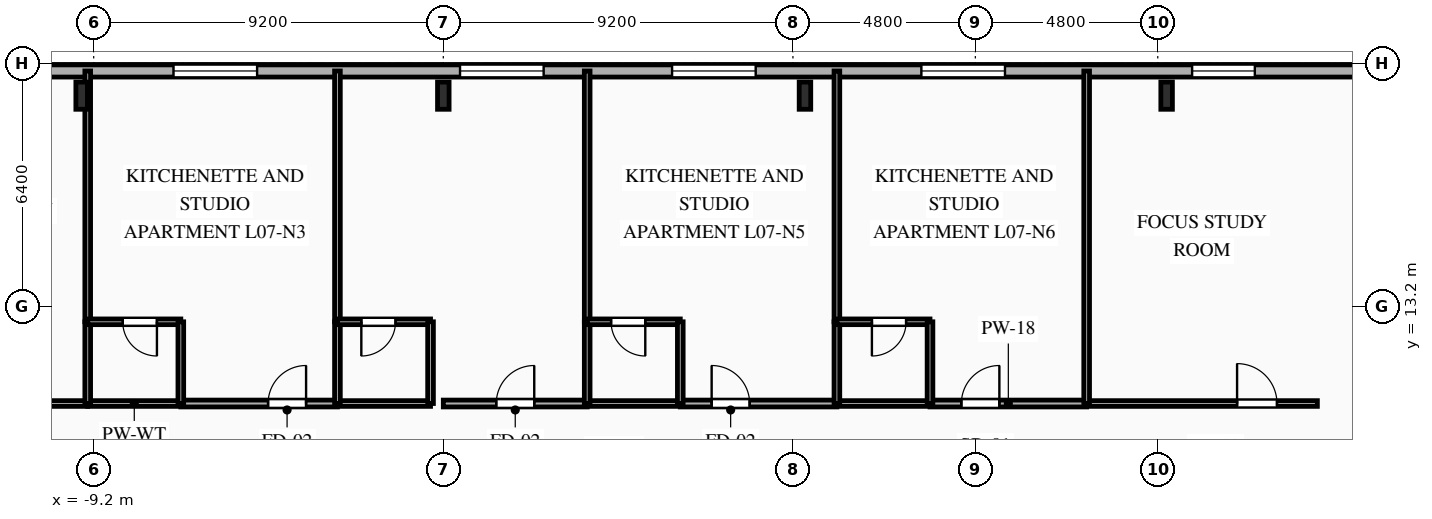
"""IFC4 building model, lengths in metres.
Left out: names, types, materials, properties, quantities, classifications, styles, units other than length and angle.
Written with IfcOpenShell. Run it as: python <this file> out.ifc"""

import sys

from ifc_helpers import new_model, si_unit, direction, frame, frame_2d, origin, origin_2d, place, context, subcontext, project, spatial, rectangle, i_section, extrude, element, fill, save


model = new_model("IFC4")
c1 = context("Model", 3, precision=1e-05, world=origin(), true_north=direction((0.0, 1.0)))
c2 = subcontext(c1, "Body", "Model", "MODEL_VIEW")
j1 = project(units=[si_unit("LENGTHUNIT", "METRE"), si_unit("PLANEANGLEUNIT", "RADIAN")], contexts=[c1])
p1 = place(None, origin())
s1 = spatial("IfcSite", under=j1, at=p1, CompositionType="ELEMENT")
p2 = place(p1, origin())
s2 = spatial("IfcBuilding", under=s1, at=p2, CompositionType="ELEMENT")
p3 = place(p2, frame((0.0, 0.0, 30.35)))
s3 = spatial("IfcBuildingStorey", under=s2, at=p3, CompositionType="ELEMENT", Elevation=30.35)
for number, where, z_axis, x_axis in (
    (1, (19.033, 18.75, 0.0), (0.0, 0.0, 1.0), (1.0, 0.0, 0.0)),
    (2, (9.517, 18.75, 0.0), (0.0, 0.0, 1.0), (1.0, 0.0, 0.0)),
    (3, (0.0, 18.75, 0.0), (0.0, 0.0, 1.0), (1.0, 0.0, 0.0)),
    (4, (-9.517, 18.75, 0.0), (0.0, 0.0, 1.0), (1.0, 0.0, 0.0)),
):
    element("IfcColumn", number, at=place(p3, frame(where, z_axis=z_axis, x_axis=x_axis)), inside=s3, PredefinedType="COLUMN", context=c2, shape_type="SweptSolid", body=[
        extrude(i_section(OverallWidth=0.304, OverallDepth=0.716, WebThickness=0.021, FlangeThickness=0.04, FilletRadius=0.027, at=origin_2d()), origin(), (0.0, 0.0, 1.0), 3.35),
    ])
p4 = place(p3, frame((-29.2, 19.4, 0.0), z_axis=(0.0, 0.0, 1.0), x_axis=(1.0, 0.0, 0.0)))
e5 = element("IfcWall", 5, at=p4, inside=s3, PredefinedType="SOLIDWALL", context=c2, shape_type="SweptSolid", body=[
    extrude(rectangle(XDim=58.4, YDim=0.32, at=frame_2d((29.2, 0.0))), origin(), (0.0, 0.0, 1.0), 3.035),
])
p5 = place(p4, frame((8.261, 0.0, 0.85)))
e6 = element("IfcOpeningElement", 6, at=p5, cuts=e5, PredefinedType="OPENING", context=c2, shape_type="SweptSolid", body=[
    extrude(rectangle(XDim=1.65, YDim=1.85, at=frame_2d((0.825, 0.925))), frame((0.0, 0.17, 0.0), z_axis=(0.0, -1.0, 0.0), x_axis=(1.0, 0.0, 0.0)), (0.0, 0.0, 1.0), 0.34),
])
p6 = place(p4, frame((17.0, 0.0, 0.85)))
e7 = element("IfcOpeningElement", 7, at=p6, cuts=e5, PredefinedType="OPENING", context=c2, shape_type="SweptSolid", body=[
    extrude(rectangle(XDim=1.6, YDim=1.85, at=frame_2d((0.8, 0.925))), frame((0.0, 0.17, 0.0), z_axis=(0.0, -1.0, 0.0), x_axis=(1.0, 0.0, 0.0)), (0.0, 0.0, 1.0), 0.34),
])
p7 = place(p4, frame((22.1, 0.0, 0.85)))
e8 = element("IfcOpeningElement", 8, at=p7, cuts=e5, PredefinedType="OPENING", context=c2, shape_type="SweptSolid", body=[
    extrude(rectangle(XDim=2.2, YDim=1.85, at=frame_2d((1.1, 0.925))), frame((0.0, 0.17, 0.0), z_axis=(0.0, -1.0, 0.0), x_axis=(1.0, 0.0, 0.0)), (0.0, 0.0, 1.0), 0.34),
])
p8 = place(p4, frame((29.64, 0.0, 0.85)))
e9 = element("IfcOpeningElement", 9, at=p8, cuts=e5, PredefinedType="OPENING", context=c2, shape_type="SweptSolid", body=[
    extrude(rectangle(XDim=2.2, YDim=1.85, at=frame_2d((1.1, 0.925))), frame((0.0, 0.17, 0.0), z_axis=(0.0, -1.0, 0.0), x_axis=(1.0, 0.0, 0.0)), (0.0, 0.0, 1.0), 0.34),
])
p9 = place(p4, frame((35.22, 0.0, 0.85)))
e10 = element("IfcOpeningElement", 10, at=p9, cuts=e5, PredefinedType="OPENING", context=c2, shape_type="SweptSolid", body=[
    extrude(rectangle(XDim=2.2, YDim=1.85, at=frame_2d((1.1, 0.925))), frame((0.0, 0.17, 0.0), z_axis=(0.0, -1.0, 0.0), x_axis=(1.0, 0.0, 0.0)), (0.0, 0.0, 1.0), 0.34),
])
p10 = place(p4, frame((41.78, 0.0, 0.85)))
e11 = element("IfcOpeningElement", 11, at=p10, cuts=e5, PredefinedType="OPENING", context=c2, shape_type="SweptSolid", body=[
    extrude(rectangle(XDim=2.2, YDim=1.85, at=frame_2d((1.1, 0.925))), frame((0.0, 0.17, 0.0), z_axis=(0.0, -1.0, 0.0), x_axis=(1.0, 0.0, 0.0)), (0.0, 0.0, 1.0), 0.34),
])
p11 = place(p4, frame((48.905, 0.0, 0.85)))
e12 = element("IfcOpeningElement", 12, at=p11, cuts=e5, PredefinedType="OPENING", context=c2, shape_type="SweptSolid", body=[
    extrude(rectangle(XDim=1.65, YDim=1.85, at=frame_2d((0.825, 0.925))), frame((0.0, 0.17, 0.0), z_axis=(0.0, -1.0, 0.0), x_axis=(1.0, 0.0, 0.0)), (0.0, 0.0, 1.0), 0.34),
])
p12 = place(p3, frame((-13.579, 10.65, 0.0), z_axis=(0.0, 0.0, 1.0), x_axis=(1.0, 0.0, 0.0)))
e13 = element("IfcWall", 13, at=p12, inside=s3, PredefinedType="PARTITIONING", context=c2, shape_type="SweptSolid", body=[
    extrude(rectangle(XDim=4.222, YDim=0.15, at=frame_2d((2.111, 0.0))), origin(), (0.0, 0.0, 1.0), 3.035),
])
p13 = place(p12, frame((0.844, 0.0, 0.0)))
e14 = element("IfcOpeningElement", 14, at=p13, cuts=e13, PredefinedType="OPENING", context=c2, shape_type="SweptSolid", body=[
    extrude(rectangle(XDim=0.95, YDim=2.1, at=frame_2d((0.475, 1.05))), frame((0.0, 0.085, 0.0), z_axis=(0.0, -1.0, 0.0), x_axis=(1.0, 0.0, 0.0)), (0.0, 0.0, 1.0), 0.17),
])
p14 = place(p3, frame((-6.907, 10.65, 0.0), z_axis=(0.0, 0.0, 1.0), x_axis=(1.0, 0.0, 0.0)))
e15 = element("IfcWall", 15, at=p14, inside=s3, PredefinedType="PARTITIONING", context=c2, shape_type="SweptSolid", body=[
    extrude(rectangle(XDim=4.121, YDim=0.18, at=frame_2d((2.061, 0.0))), origin(), (0.0, 0.0, 1.0), 3.035),
])
p15 = place(p14, frame((2.296, 0.0, 0.0)))
e16 = element("IfcOpeningElement", 16, at=p15, cuts=e15, PredefinedType="OPENING", context=c2, shape_type="SweptSolid", body=[
    extrude(rectangle(XDim=1.0, YDim=2.15, at=frame_2d((0.5, 1.075))), frame((0.0, 0.1, 0.0), z_axis=(0.0, -1.0, 0.0), x_axis=(1.0, 0.0, 0.0)), (0.0, 0.0, 1.0), 0.2),
])
for number, where, z_axis, x_axis in (
    (17, (-9.357, 10.65, 0.0), (0.0, 0.0, 1.0), (1.0, 0.0, 0.0)),
    (18, (-2.786, 10.65, 0.0), (0.0, 0.0, 1.0), (1.0, 0.0, 0.0)),
):
    element("IfcWall", number, at=place(p3, frame(where, z_axis=z_axis, x_axis=x_axis)), inside=s3, PredefinedType="PLUMBINGWALL", context=c2, shape_type="SweptSolid", body=[
        extrude(rectangle(XDim=2.45, YDim=0.15, at=frame_2d((1.225, 0.0))), origin(), (0.0, 0.0, 1.0), 3.035),
    ])
p16 = place(p3, frame((0.0, 10.65, 0.0), z_axis=(0.0, 0.0, 1.0), x_axis=(1.0, 0.0, 0.0)))
e19 = element("IfcWall", 19, at=p16, inside=s3, PredefinedType="PARTITIONING", context=c2, shape_type="SweptSolid", body=[
    extrude(rectangle(XDim=3.786, YDim=0.18, at=frame_2d((1.893, 0.0))), origin(), (0.0, 0.0, 1.0), 3.035),
])
p17 = place(p16, frame((1.393, 0.0, 0.0)))
e20 = element("IfcOpeningElement", 20, at=p17, cuts=e19, PredefinedType="OPENING", context=c2, shape_type="SweptSolid", body=[
    extrude(rectangle(XDim=1.0, YDim=2.15, at=frame_2d((0.5, 1.075))), frame((0.0, 0.1, 0.0), z_axis=(0.0, -1.0, 0.0), x_axis=(1.0, 0.0, 0.0)), (0.0, 0.0, 1.0), 0.2),
])
p18 = place(p3, frame((6.236, 10.65, 0.0), z_axis=(0.0, 0.0, 1.0), x_axis=(1.0, 0.0, 0.0)))
e21 = element("IfcWall", 21, at=p18, inside=s3, PredefinedType="PARTITIONING", context=c2, shape_type="SweptSolid", body=[
    extrude(rectangle(XDim=4.121, YDim=0.18, at=frame_2d((2.061, 0.0))), origin(), (0.0, 0.0, 1.0), 3.035),
])
p19 = place(p18, frame((0.825, 0.0, 0.0)))
e22 = element("IfcOpeningElement", 22, at=p19, cuts=e21, PredefinedType="OPENING", context=c2, shape_type="SweptSolid", body=[
    extrude(rectangle(XDim=1.0, YDim=2.15, at=frame_2d((0.5, 1.075))), frame((0.0, 0.1, 0.0), z_axis=(0.0, -1.0, 0.0), x_axis=(1.0, 0.0, 0.0)), (0.0, 0.0, 1.0), 0.2),
])
p20 = place(p3, frame((3.786, 10.65, 0.0), z_axis=(0.0, 0.0, 1.0), x_axis=(1.0, 0.0, 0.0)))
e23 = element("IfcWall", 23, at=p20, inside=s3, PredefinedType="PLUMBINGWALL", context=c2, shape_type="SweptSolid", body=[
    extrude(rectangle(XDim=2.45, YDim=0.15, at=frame_2d((1.225, 0.0))), origin(), (0.0, 0.0, 1.0), 3.035),
])
p21 = place(p3, frame((12.807, 10.65, 0.0), z_axis=(0.0, 0.0, 1.0), x_axis=(1.0, 0.0, 0.0)))
e24 = element("IfcWall", 24, at=p21, inside=s3, PredefinedType="PARTITIONING", context=c2, shape_type="SweptSolid", body=[
    extrude(rectangle(XDim=4.122, YDim=0.18, at=frame_2d((2.061, 0.0))), origin(), (0.0, 0.0, 1.0), 3.035),
])
p22 = place(p21, frame((0.825, 0.0, 0.0)))
e25 = element("IfcOpeningElement", 25, at=p22, cuts=e24, PredefinedType="OPENING", context=c2, shape_type="SweptSolid", body=[
    extrude(rectangle(XDim=1.0, YDim=2.15, at=frame_2d((0.5, 1.075))), frame((0.0, 0.1, 0.0), z_axis=(0.0, -1.0, 0.0), x_axis=(1.0, 0.0, 0.0)), (0.0, 0.0, 1.0), 0.2),
])
p23 = place(p3, frame((10.357, 10.65, 0.0), z_axis=(0.0, 0.0, 1.0), x_axis=(1.0, 0.0, 0.0)))
e26 = element("IfcWall", 26, at=p23, inside=s3, PredefinedType="PLUMBINGWALL", context=c2, shape_type="SweptSolid", body=[
    extrude(rectangle(XDim=2.45, YDim=0.15, at=frame_2d((1.225, 0.0))), origin(), (0.0, 0.0, 1.0), 3.035),
])
p24 = place(p3, frame((16.929, 10.65, 0.0), z_axis=(0.0, 0.0, 1.0), x_axis=(1.0, 0.0, 0.0)))
e27 = element("IfcWall", 27, at=p24, inside=s3, PredefinedType="PARTITIONING", context=c2, shape_type="SweptSolid", body=[
    extrude(rectangle(XDim=6.071, YDim=0.15, at=frame_2d((3.036, 0.0))), origin(), (0.0, 0.0, 1.0), 3.035),
])
p25 = place(p24, frame((3.958, 0.0, 0.0)))
e28 = element("IfcOpeningElement", 28, at=p25, cuts=e27, PredefinedType="OPENING", context=c2, shape_type="SweptSolid", body=[
    extrude(rectangle(XDim=1.05, YDim=2.15, at=frame_2d((0.525, 1.075))), frame((0.0, 0.085, 0.0), z_axis=(0.0, -1.0, 0.0), x_axis=(1.0, 0.0, 0.0)), (0.0, 0.0, 1.0), 0.17),
])
p26 = place(p3, frame((-9.357, 19.4, 0.0), z_axis=(0.0, 0.0, 1.0), x_axis=(0.0, -1.0, 0.0)))
e29 = element("IfcWall", 29, at=p26, inside=s3, PredefinedType="PARTITIONING", context=c2, shape_type="SweptSolid", body=[
    extrude(rectangle(XDim=6.6, YDim=0.15, at=frame_2d((3.3, 0.0))), origin(), (0.0, 0.0, 1.0), 2.52),
])
p27 = place(p3, frame((-9.357, 12.8, 0.0), z_axis=(0.0, 0.0, 1.0), x_axis=(0.0, -1.0, 0.0)))
e30 = element("IfcWall", 30, at=p27, inside=s3, PredefinedType="PLUMBINGWALL", context=c2, shape_type="SweptSolid", body=[
    extrude(rectangle(XDim=2.15, YDim=0.15, at=frame_2d((1.075, 0.0))), origin(), (0.0, 0.0, 1.0), 2.52),
])
p28 = place(p3, frame((-6.907, 12.8, 0.0), z_axis=(0.0, 0.0, 1.0), x_axis=(-1.0, 0.0, 0.0)))
e31 = element("IfcWall", 31, at=p28, inside=s3, PredefinedType="PLUMBINGWALL", context=c2, shape_type="SweptSolid", body=[
    extrude(rectangle(XDim=2.45, YDim=0.15, at=frame_2d((1.225, 0.0))), origin(), (0.0, 0.0, 1.0), 3.035),
])
p29 = place(p28, frame((0.629, 0.0, 0.0)))
e32 = element("IfcOpeningElement", 32, at=p29, cuts=e31, PredefinedType="OPENING", context=c2, shape_type="SweptSolid", body=[
    extrude(rectangle(XDim=0.9, YDim=2.1, at=frame_2d((0.45, 1.05))), frame((0.0, 0.085, 0.0), z_axis=(0.0, -1.0, 0.0), x_axis=(1.0, 0.0, 0.0)), (0.0, 0.0, 1.0), 0.17),
])
p30 = place(p3, frame((-6.907, 10.65, 0.0), z_axis=(0.0, 0.0, 1.0), x_axis=(0.0, 1.0, 0.0)))
e33 = element("IfcWall", 33, at=p30, inside=s3, PredefinedType="PLUMBINGWALL", context=c2, shape_type="SweptSolid", body=[
    extrude(rectangle(XDim=2.15, YDim=0.15, at=frame_2d((1.075, 0.0))), origin(), (0.0, 0.0, 1.0), 3.035),
])
p31 = place(p3, frame((-2.786, 19.4, 0.0), z_axis=(0.0, 0.0, 1.0), x_axis=(0.0, -1.0, 0.0)))
e34 = element("IfcWall", 34, at=p31, inside=s3, PredefinedType="PARTITIONING", context=c2, shape_type="SweptSolid", body=[
    extrude(rectangle(XDim=6.6, YDim=0.15, at=frame_2d((3.3, 0.0))), origin(), (0.0, 0.0, 1.0), 3.035),
])
p32 = place(p3, frame((-2.786, 12.8, 0.0), z_axis=(0.0, 0.0, 1.0), x_axis=(0.0, -1.0, 0.0)))
e35 = element("IfcWall", 35, at=p32, inside=s3, PredefinedType="PLUMBINGWALL", context=c2, shape_type="SweptSolid", body=[
    extrude(rectangle(XDim=2.15, YDim=0.15, at=frame_2d((1.075, 0.0))), origin(), (0.0, 0.0, 1.0), 3.035),
])
p33 = place(p3, frame((-0.336, 12.8, 0.0), z_axis=(0.0, 0.0, 1.0), x_axis=(-1.0, 0.0, 0.0)))
e36 = element("IfcWall", 36, at=p33, inside=s3, PredefinedType="PLUMBINGWALL", context=c2, shape_type="SweptSolid", body=[
    extrude(rectangle(XDim=2.45, YDim=0.15, at=frame_2d((1.225, 0.0))), origin(), (0.0, 0.0, 1.0), 3.035),
])
p34 = place(p33, frame((0.921, 0.0, 0.0)))
e37 = element("IfcOpeningElement", 37, at=p34, cuts=e36, PredefinedType="OPENING", context=c2, shape_type="SweptSolid", body=[
    extrude(rectangle(XDim=0.9, YDim=2.1, at=frame_2d((0.45, 1.05))), frame((0.0, 0.085, 0.0), z_axis=(0.0, -1.0, 0.0), x_axis=(1.0, 0.0, 0.0)), (0.0, 0.0, 1.0), 0.17),
])
p35 = place(p3, frame((-0.336, 10.65, 0.0), z_axis=(0.0, 0.0, 1.0), x_axis=(0.0, 1.0, 0.0)))
e38 = element("IfcWall", 38, at=p35, inside=s3, PredefinedType="PLUMBINGWALL", context=c2, shape_type="SweptSolid", body=[
    extrude(rectangle(XDim=2.15, YDim=0.15, at=frame_2d((1.075, 0.0))), origin(), (0.0, 0.0, 1.0), 3.035),
])
p36 = place(p3, frame((3.786, 19.4, 0.0), z_axis=(0.0, 0.0, 1.0), x_axis=(0.0, -1.0, 0.0)))
e39 = element("IfcWall", 39, at=p36, inside=s3, PredefinedType="PARTITIONING", context=c2, shape_type="SweptSolid", body=[
    extrude(rectangle(XDim=6.6, YDim=0.15, at=frame_2d((3.3, 0.0))), origin(), (0.0, 0.0, 1.0), 3.035),
])
p37 = place(p3, frame((3.786, 12.8, 0.0), z_axis=(0.0, 0.0, 1.0), x_axis=(0.0, -1.0, 0.0)))
e40 = element("IfcWall", 40, at=p37, inside=s3, PredefinedType="PLUMBINGWALL", context=c2, shape_type="SweptSolid", body=[
    extrude(rectangle(XDim=2.15, YDim=0.15, at=frame_2d((1.075, 0.0))), origin(), (0.0, 0.0, 1.0), 3.035),
])
p38 = place(p3, frame((6.236, 12.8, 0.0), z_axis=(0.0, 0.0, 1.0), x_axis=(-1.0, 0.0, 0.0)))
e41 = element("IfcWall", 41, at=p38, inside=s3, PredefinedType="PLUMBINGWALL", context=c2, shape_type="SweptSolid", body=[
    extrude(rectangle(XDim=2.45, YDim=0.15, at=frame_2d((1.225, 0.0))), origin(), (0.0, 0.0, 1.0), 3.035),
])
p39 = place(p38, frame((0.921, 0.0, 0.0)))
e42 = element("IfcOpeningElement", 42, at=p39, cuts=e41, PredefinedType="OPENING", context=c2, shape_type="SweptSolid", body=[
    extrude(rectangle(XDim=0.9, YDim=2.1, at=frame_2d((0.45, 1.05))), frame((0.0, 0.085, 0.0), z_axis=(0.0, -1.0, 0.0), x_axis=(1.0, 0.0, 0.0)), (0.0, 0.0, 1.0), 0.17),
])
p40 = place(p3, frame((6.236, 10.65, 0.0), z_axis=(0.0, 0.0, 1.0), x_axis=(0.0, 1.0, 0.0)))
e43 = element("IfcWall", 43, at=p40, inside=s3, PredefinedType="PLUMBINGWALL", context=c2, shape_type="SweptSolid", body=[
    extrude(rectangle(XDim=2.15, YDim=0.15, at=frame_2d((1.075, 0.0))), origin(), (0.0, 0.0, 1.0), 3.035),
])
p41 = place(p3, frame((10.357, 19.4, 0.0), z_axis=(0.0, 0.0, 1.0), x_axis=(0.0, -1.0, 0.0)))
e44 = element("IfcWall", 44, at=p41, inside=s3, PredefinedType="PARTITIONING", context=c2, shape_type="SweptSolid", body=[
    extrude(rectangle(XDim=6.6, YDim=0.15, at=frame_2d((3.3, 0.0))), origin(), (0.0, 0.0, 1.0), 3.035),
])
p42 = place(p3, frame((10.357, 12.8, 0.0), z_axis=(0.0, 0.0, 1.0), x_axis=(0.0, -1.0, 0.0)))
e45 = element("IfcWall", 45, at=p42, inside=s3, PredefinedType="PLUMBINGWALL", context=c2, shape_type="SweptSolid", body=[
    extrude(rectangle(XDim=2.15, YDim=0.15, at=frame_2d((1.075, 0.0))), origin(), (0.0, 0.0, 1.0), 3.035),
])
p43 = place(p3, frame((12.807, 12.8, 0.0), z_axis=(0.0, 0.0, 1.0), x_axis=(-1.0, 0.0, 0.0)))
e46 = element("IfcWall", 46, at=p43, inside=s3, PredefinedType="PLUMBINGWALL", context=c2, shape_type="SweptSolid", body=[
    extrude(rectangle(XDim=2.45, YDim=0.15, at=frame_2d((1.225, 0.0))), origin(), (0.0, 0.0, 1.0), 3.035),
])
p44 = place(p43, frame((0.629, 0.0, 0.0)))
e47 = element("IfcOpeningElement", 47, at=p44, cuts=e46, PredefinedType="OPENING", context=c2, shape_type="SweptSolid", body=[
    extrude(rectangle(XDim=0.9, YDim=2.1, at=frame_2d((0.45, 1.05))), frame((0.0, 0.085, 0.0), z_axis=(0.0, -1.0, 0.0), x_axis=(1.0, 0.0, 0.0)), (0.0, 0.0, 1.0), 0.17),
])
p45 = place(p3, frame((12.807, 10.65, 0.0), z_axis=(0.0, 0.0, 1.0), x_axis=(0.0, 1.0, 0.0)))
e48 = element("IfcWall", 48, at=p45, inside=s3, PredefinedType="PLUMBINGWALL", context=c2, shape_type="SweptSolid", body=[
    extrude(rectangle(XDim=2.15, YDim=0.15, at=frame_2d((1.075, 0.0))), origin(), (0.0, 0.0, 1.0), 3.035),
])
p46 = place(p3, frame((16.929, 19.4, 0.0), z_axis=(0.0, 0.0, 1.0), x_axis=(0.0, -1.0, 0.0)))
e49 = element("IfcWall", 49, at=p46, inside=s3, PredefinedType="PARTITIONING", context=c2, shape_type="SweptSolid", body=[
    extrude(rectangle(XDim=8.75, YDim=0.15, at=frame_2d((4.375, 0.0))), origin(), (0.0, 0.0, 1.0), 3.035),
])
p47 = place(p7, origin())
e50 = element("IfcWindow", 50, at=p47, inside=s3, PartitioningType="SINGLE_PANEL", PredefinedType="WINDOW", context=c2, shape_type="SweptSolid", body=[
    extrude(rectangle(XDim=2.2, YDim=1.85, at=frame_2d((1.1, 0.925))), frame((0.0, 0.03, 0.0), z_axis=(0.0, -1.0, 0.0), x_axis=(1.0, 0.0, 0.0)), (0.0, 0.0, 1.0), 0.06),
])
fill(e8, e50)
p48 = place(p8, origin())
e51 = element("IfcWindow", 51, at=p48, inside=s3, PartitioningType="SINGLE_PANEL", PredefinedType="WINDOW", context=c2, shape_type="SweptSolid", body=[
    extrude(rectangle(XDim=2.2, YDim=1.85, at=frame_2d((1.1, 0.925))), frame((0.0, 0.03, 0.0), z_axis=(0.0, -1.0, 0.0), x_axis=(1.0, 0.0, 0.0)), (0.0, 0.0, 1.0), 0.06),
])
fill(e9, e51)
p49 = place(p9, origin())
e52 = element("IfcWindow", 52, at=p49, inside=s3, PartitioningType="SINGLE_PANEL", PredefinedType="WINDOW", context=c2, shape_type="SweptSolid", body=[
    extrude(rectangle(XDim=2.2, YDim=1.85, at=frame_2d((1.1, 0.925))), frame((0.0, 0.03, 0.0), z_axis=(0.0, -1.0, 0.0), x_axis=(1.0, 0.0, 0.0)), (0.0, 0.0, 1.0), 0.06),
])
fill(e10, e52)
p50 = place(p10, origin())
e53 = element("IfcWindow", 53, at=p50, inside=s3, PartitioningType="SINGLE_PANEL", PredefinedType="WINDOW", context=c2, shape_type="SweptSolid", body=[
    extrude(rectangle(XDim=2.2, YDim=1.85, at=frame_2d((1.1, 0.925))), frame((0.0, 0.03, 0.0), z_axis=(0.0, -1.0, 0.0), x_axis=(1.0, 0.0, 0.0)), (0.0, 0.0, 1.0), 0.06),
])
fill(e11, e53)
p51 = place(p11, origin())
e54 = element("IfcWindow", 54, at=p51, inside=s3, PartitioningType="SINGLE_PANEL", PredefinedType="WINDOW", context=c2, shape_type="SweptSolid", body=[
    extrude(rectangle(XDim=1.65, YDim=1.85, at=frame_2d((0.825, 0.925))), frame((0.0, 0.03, 0.0), z_axis=(0.0, -1.0, 0.0), x_axis=(1.0, 0.0, 0.0)), (0.0, 0.0, 1.0), 0.06),
])
fill(e12, e54)
p52 = place(p15, origin())
e55 = element("IfcDoor", 55, at=p52, inside=s3, OperationType="SINGLE_SWING_RIGHT", PredefinedType="DOOR", context=c2, shape_type="SweptSolid", body=[
    extrude(rectangle(XDim=1.0, YDim=2.15, at=frame_2d((0.5, 1.075))), frame((0.0, 0.025, 0.0), z_axis=(0.0, -1.0, 0.0), x_axis=(1.0, 0.0, 0.0)), (0.0, 0.0, 1.0), 0.05),
])
fill(e16, e55)
p53 = place(p17, origin())
e56 = element("IfcDoor", 56, at=p53, inside=s3, OperationType="SINGLE_SWING_RIGHT", PredefinedType="DOOR", context=c2, shape_type="SweptSolid", body=[
    extrude(rectangle(XDim=1.0, YDim=2.15, at=frame_2d((0.5, 1.075))), frame((0.0, 0.025, 0.0), z_axis=(0.0, -1.0, 0.0), x_axis=(1.0, 0.0, 0.0)), (0.0, 0.0, 1.0), 0.05),
])
fill(e20, e56)
p54 = place(p19, origin())
e57 = element("IfcDoor", 57, at=p54, inside=s3, OperationType="SINGLE_SWING_LEFT", PredefinedType="DOOR", context=c2, shape_type="SweptSolid", body=[
    extrude(rectangle(XDim=1.0, YDim=2.15, at=frame_2d((0.5, 1.075))), frame((0.0, 0.025, 0.0), z_axis=(0.0, -1.0, 0.0), x_axis=(1.0, 0.0, 0.0)), (0.0, 0.0, 1.0), 0.05),
])
fill(e22, e57)
p55 = place(p22, origin())
e58 = element("IfcDoor", 58, at=p55, inside=s3, OperationType="SINGLE_SWING_RIGHT", PredefinedType="DOOR", context=c2, shape_type="SweptSolid", body=[
    extrude(rectangle(XDim=1.0, YDim=2.15, at=frame_2d((0.5, 1.075))), frame((0.0, 0.025, 0.0), z_axis=(0.0, -1.0, 0.0), x_axis=(1.0, 0.0, 0.0)), (0.0, 0.0, 1.0), 0.05),
])
fill(e25, e58)
p56 = place(p25, origin())
e59 = element("IfcDoor", 59, at=p56, inside=s3, OperationType="SINGLE_SWING_LEFT", PredefinedType="DOOR", context=c2, shape_type="SweptSolid", body=[
    extrude(rectangle(XDim=1.05, YDim=2.15, at=frame_2d((0.525, 1.075))), frame((0.0, 0.025, 0.0), z_axis=(0.0, -1.0, 0.0), x_axis=(1.0, 0.0, 0.0)), (0.0, 0.0, 1.0), 0.05),
])
fill(e28, e59)
p57 = place(p29, origin())
e60 = element("IfcDoor", 60, at=p57, inside=s3, OperationType="SINGLE_SWING_LEFT", PredefinedType="DOOR", context=c2, shape_type="SweptSolid", body=[
    extrude(rectangle(XDim=0.9, YDim=2.1, at=frame_2d((0.45, 1.05))), frame((0.0, 0.025, 0.0), z_axis=(0.0, -1.0, 0.0), x_axis=(1.0, 0.0, 0.0)), (0.0, 0.0, 1.0), 0.05),
])
fill(e32, e60)
p58 = place(p34, origin())
e61 = element("IfcDoor", 61, at=p58, inside=s3, OperationType="SINGLE_SWING_RIGHT", PredefinedType="DOOR", context=c2, shape_type="SweptSolid", body=[
    extrude(rectangle(XDim=0.9, YDim=2.1, at=frame_2d((0.45, 1.05))), frame((0.0, 0.025, 0.0), z_axis=(0.0, -1.0, 0.0), x_axis=(1.0, 0.0, 0.0)), (0.0, 0.0, 1.0), 0.05),
])
fill(e37, e61)
p59 = place(p39, origin())
e62 = element("IfcDoor", 62, at=p59, inside=s3, OperationType="SINGLE_SWING_LEFT", PredefinedType="DOOR", context=c2, shape_type="SweptSolid", body=[
    extrude(rectangle(XDim=0.9, YDim=2.1, at=frame_2d((0.45, 1.05))), frame((0.0, 0.025, 0.0), z_axis=(0.0, -1.0, 0.0), x_axis=(1.0, 0.0, 0.0)), (0.0, 0.0, 1.0), 0.05),
])
fill(e42, e62)
p60 = place(p44, origin())
e63 = element("IfcDoor", 63, at=p60, inside=s3, OperationType="SINGLE_SWING_RIGHT", PredefinedType="DOOR", context=c2, shape_type="SweptSolid", body=[
    extrude(rectangle(XDim=0.9, YDim=2.1, at=frame_2d((0.45, 1.05))), frame((0.0, 0.025, 0.0), z_axis=(0.0, -1.0, 0.0), x_axis=(1.0, 0.0, 0.0)), (0.0, 0.0, 1.0), 0.05),
])
fill(e47, e63)
save(model, sys.argv[1])
